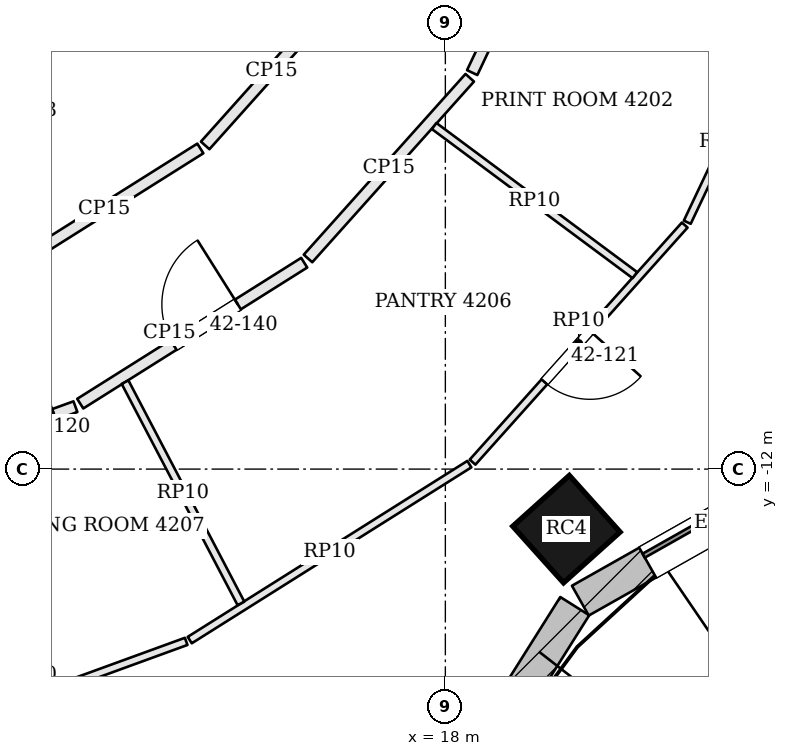
"""IFC4 building model, lengths in metres.
Left out: names, types, materials, properties, quantities, classifications, styles, units other than length and angle.
Written with IfcOpenShell. Run it as: python <this file> out.ifc"""

import sys

from ifc_helpers import new_model, si_unit, direction, frame, frame_2d, origin, origin_2d, place, context, subcontext, project, spatial, rectangle, extrude, element, fill, save


model = new_model("IFC4")
c1 = context("Model", 3, precision=1e-05, world=origin(), true_north=direction((0.0, 1.0)))
c2 = subcontext(c1, "Body", "Model", "MODEL_VIEW")
j1 = project(units=[si_unit("LENGTHUNIT", "METRE"), si_unit("PLANEANGLEUNIT", "RADIAN")], contexts=[c1])
p1 = place(None, origin())
s1 = spatial("IfcSite", under=j1, at=p1, CompositionType="ELEMENT")
p2 = place(p1, origin())
s2 = spatial("IfcBuilding", under=s1, at=p2, CompositionType="ELEMENT")
p3 = place(p2, frame((0.0, 0.0, 174.0)))
s3 = spatial("IfcBuildingStorey", under=s2, at=p3, CompositionType="ELEMENT", Elevation=174.0)
p4 = place(p3, frame((19.593, -12.79, -0.7), z_axis=(0.0, 0.0, 1.0), x_axis=(0.744021317198, 0.668155879683, 0.0)))
e1 = element("IfcColumn", 1, at=p4, inside=s3, PredefinedType="COLUMN", context=c2, shape_type="SweptSolid", body=[
    extrude(rectangle(XDim=1.0, YDim=1.0, at=origin_2d()), origin(), (0.0, 0.0, 1.0), 4.6),
])
p5 = place(p3, frame((16.998, -18.099, 0.0), z_axis=(0.0, 0.0, 1.0), x_axis=(0.532745661304, 0.846275404559, 0.0)))
e2 = element("IfcWall", 2, at=p5, inside=s3, PredefinedType="SOLIDWALL", context=c2, shape_type="SweptSolid", body=[
    extrude(rectangle(XDim=5.076, YDim=0.45, at=frame_2d((2.538, 0.0))), origin(), (0.0, 0.0, 1.0), 3.7),
])
p6 = place(p5, frame((1.488, 0.0, 0.9)))
e3 = element("IfcOpeningElement", 3, at=p6, cuts=e2, PredefinedType="OPENING", context=c2, shape_type="SweptSolid", body=[
    extrude(rectangle(XDim=2.1, YDim=2.3, at=frame_2d((1.05, 1.15))), frame((0.0, 0.235, 0.0), z_axis=(0.0, -1.0, 0.0), x_axis=(1.0, 0.0, 0.0)), (0.0, 0.0, 1.0), 0.47),
])
p7 = place(p3, frame((19.776, -13.731, 0.0), z_axis=(0.0, 0.0, 1.0), x_axis=(0.870610133829, 0.491973571318, 0.0)))
e4 = element("IfcWall", 4, at=p7, inside=s3, PredefinedType="SOLIDWALL", context=c2, shape_type="SweptSolid", body=[
    extrude(rectangle(XDim=4.134, YDim=0.45, at=frame_2d((2.067, 0.0))), origin(), (0.0, 0.0, 1.0), 3.7),
])
p8 = place(p7, frame((1.017, 0.0, 0.9)))
e5 = element("IfcOpeningElement", 5, at=p8, cuts=e4, PredefinedType="OPENING", context=c2, shape_type="SweptSolid", body=[
    extrude(rectangle(XDim=2.1, YDim=2.3, at=frame_2d((1.05, 1.15))), frame((0.0, 0.235, 0.0), z_axis=(0.0, -1.0, 0.0), x_axis=(1.0, 0.0, 0.0)), (0.0, 0.0, 1.0), 0.47),
])
p9 = place(p3, frame((9.676, -12.438, 0.0), z_axis=(0.0, 0.0, 1.0), x_axis=(0.939640289748, 0.342163887461, 0.0)))
e6 = element("IfcWall", 6, at=p9, inside=s3, PredefinedType="PARTITIONING", context=c2, shape_type="SweptSolid", body=[
    extrude(rectangle(XDim=3.68, YDim=0.15, at=frame_2d((1.84, 0.0))), origin(), (0.0, 0.0, 1.0), 3.084),
])
p10 = place(p9, frame((2.38, 0.0, 0.0)))
e7 = element("IfcOpeningElement", 7, at=p10, cuts=e6, PredefinedType="OPENING", context=c2, shape_type="SweptSolid", body=[
    extrude(rectangle(XDim=1.0, YDim=2.4, at=frame_2d((0.5, 1.2))), frame((0.0, 0.085, 0.0), z_axis=(0.0, -1.0, 0.0), x_axis=(1.0, 0.0, 0.0)), (0.0, 0.0, 1.0), 0.17),
])
p11 = place(p3, frame((13.197, -11.139, 0.0), z_axis=(0.0, 0.0, 1.0), x_axis=(0.846390903833, 0.532562144644, 0.0)))
e8 = element("IfcWall", 8, at=p11, inside=s3, PredefinedType="PARTITIONING", context=c2, shape_type="SweptSolid", body=[
    extrude(rectangle(XDim=3.481, YDim=0.15, at=frame_2d((1.741, 0.0))), origin(), (0.0, 0.0, 1.0), 3.084),
])
p12 = place(p11, frame((1.45, 0.0, 0.0)))
e9 = element("IfcOpeningElement", 9, at=p12, cuts=e8, PredefinedType="OPENING", context=c2, shape_type="SweptSolid", body=[
    extrude(rectangle(XDim=1.0, YDim=2.1, at=frame_2d((0.5, 1.05))), frame((0.0, 0.085, 0.0), z_axis=(0.0, -1.0, 0.0), x_axis=(1.0, 0.0, 0.0)), (0.0, 0.0, 1.0), 0.17),
])
p13 = place(p3, frame((16.193, -9.229, 0.0), z_axis=(0.0, 0.0, 1.0), x_axis=(0.666882089048, 0.745163256815, 0.0)))
e10 = element("IfcWall", 10, at=p13, inside=s3, PredefinedType="PARTITIONING", context=c2, shape_type="SweptSolid", body=[
    extrude(rectangle(XDim=3.19, YDim=0.15, at=frame_2d((1.595, 0.0))), origin(), (0.0, 0.0, 1.0), 3.084),
])
p14 = place(p3, frame((18.353, -6.784, 0.0), z_axis=(0.0, 0.0, 1.0), x_axis=(0.428125964575, 0.90371907054, 0.0)))
e11 = element("IfcWall", 11, at=p14, inside=s3, PredefinedType="PARTITIONING", context=c2, shape_type="SweptSolid", body=[
    extrude(rectangle(XDim=1.589, YDim=0.15, at=frame_2d((0.795, 0.0))), origin(), (0.0, 0.0, 1.0), 3.084),
])
p15 = place(p14, frame((0.35, 0.0, 0.0)))
e12 = element("IfcOpeningElement", 12, at=p15, cuts=e11, PredefinedType="OPENING", context=c2, shape_type="SweptSolid", body=[
    extrude(rectangle(XDim=0.9, YDim=2.1, at=frame_2d((0.45, 1.05))), frame((0.0, 0.085, 0.0), z_axis=(0.0, -1.0, 0.0), x_axis=(1.0, 0.0, 0.0)), (0.0, 0.0, 1.0), 0.17),
])
p16 = place(p3, frame((27.593, -8.816, 0.0), z_axis=(0.0, 0.0, 1.0), x_axis=(-0.9267854071, 0.375591279433, 0.0)))
e13 = element("IfcWall", 13, at=p16, inside=s3, PredefinedType="PARTITIONING", context=c2, shape_type="SweptSolid", body=[
    extrude(rectangle(XDim=9.161, YDim=0.15, at=frame_2d((4.58, 0.0))), origin(), (0.0, 0.0, 1.0), 3.234),
])
p17 = place(p3, frame((16.587, -5.789, 0.0), z_axis=(0.0, 0.0, 1.0), x_axis=(-0.666887460656, -0.745158449472, 0.0)))
e14 = element("IfcWall", 14, at=p17, inside=s3, PredefinedType="PARTITIONING", context=c2, shape_type="SweptSolid", body=[
    extrude(rectangle(XDim=2.62, YDim=0.15, at=frame_2d((1.31, 0.0))), origin(), (0.0, 0.0, 1.0), 3.084),
])
p18 = place(p3, frame((14.777, -7.781, 0.0), z_axis=(0.0, 0.0, 1.0), x_axis=(-0.846359741043, -0.532611667862, 0.0)))
e15 = element("IfcWall", 15, at=p18, inside=s3, PredefinedType="PARTITIONING", context=c2, shape_type="SweptSolid", body=[
    extrude(rectangle(XDim=2.987, YDim=0.15, at=frame_2d((1.494, 0.0))), origin(), (0.0, 0.0, 1.0), 3.084),
])
p19 = place(p3, frame((22.181, -6.645, 0.0), z_axis=(0.0, 0.0, 1.0), x_axis=(-0.428144841987, -0.903710127353, 0.0)))
e16 = element("IfcWall", 16, at=p19, inside=s3, PredefinedType="PARTITIONING", context=c2, shape_type="SweptSolid", body=[
    extrude(rectangle(XDim=2.332, YDim=0.1, at=frame_2d((1.166, 0.0))), origin(), (0.0, 0.0, 1.0), 3.084),
])
p20 = place(p3, frame((21.149, -8.789, 0.0), z_axis=(0.0, 0.0, 1.0), x_axis=(-0.666915902537, -0.745132994132, 0.0)))
e17 = element("IfcWall", 17, at=p20, inside=s3, PredefinedType="PARTITIONING", context=c2, shape_type="SweptSolid", body=[
    extrude(rectangle(XDim=4.186, YDim=0.1, at=frame_2d((2.093, 0.0))), origin(), (0.0, 0.0, 1.0), 3.084),
])
p21 = place(p20, frame((1.869, 0.0, 0.0)))
e18 = element("IfcOpeningElement", 18, at=p21, cuts=e17, PredefinedType="OPENING", context=c2, shape_type="SweptSolid", body=[
    extrude(rectangle(XDim=0.9, YDim=2.1, at=frame_2d((0.45, 1.05))), frame((0.0, 0.06, 0.0), z_axis=(0.0, -1.0, 0.0), x_axis=(1.0, 0.0, 0.0)), (0.0, 0.0, 1.0), 0.12),
])
p22 = place(p3, frame((18.316, -11.935, 0.0), z_axis=(0.0, 0.0, 1.0), x_axis=(-0.84637539713, -0.532586788358, 0.0)))
e19 = element("IfcWall", 19, at=p22, inside=s3, PredefinedType="PARTITIONING", context=c2, shape_type="SweptSolid", body=[
    extrude(rectangle(XDim=4.346, YDim=0.1, at=frame_2d((2.173, 0.0))), origin(), (0.0, 0.0, 1.0), 3.084),
])
p23 = place(p3, frame((14.59, -14.267, 0.0), z_axis=(0.0, 0.0, 1.0), x_axis=(-0.939623405418, -0.342210251148, 0.0)))
e20 = element("IfcWall", 20, at=p23, inside=s3, PredefinedType="PARTITIONING", context=c2, shape_type="SweptSolid", body=[
    extrude(rectangle(XDim=4.363, YDim=0.1, at=frame_2d((2.182, 0.0))), origin(), (0.0, 0.0, 1.0), 3.084),
])
p24 = place(p23, frame((2.15, 0.0, 0.0)))
e21 = element("IfcOpeningElement", 21, at=p24, cuts=e20, PredefinedType="OPENING", context=c2, shape_type="SweptSolid", body=[
    extrude(rectangle(XDim=1.0, YDim=2.1, at=frame_2d((0.5, 1.05))), frame((0.0, 0.06, 0.0), z_axis=(0.0, -1.0, 0.0), x_axis=(1.0, 0.0, 0.0)), (0.0, 0.0, 1.0), 0.12),
])
p25 = place(p3, frame((13.786, -10.856, 0.0), z_axis=(0.0, 0.0, 1.0), x_axis=(0.464015323866, -0.885827172318, 0.0)))
e22 = element("IfcWall", 22, at=p25, inside=s3, PredefinedType="PARTITIONING", context=c2, shape_type="SweptSolid", body=[
    extrude(rectangle(XDim=3.286, YDim=0.1, at=frame_2d((1.643, 0.0))), origin(), (0.0, 0.0, 1.0), 3.084),
])
p26 = place(p3, frame((17.853, -7.487, 0.0), z_axis=(0.0, 0.0, 1.0), x_axis=(0.802681916891, -0.596407361034, 0.0)))
e23 = element("IfcWall", 23, at=p26, inside=s3, PredefinedType="PARTITIONING", context=c2, shape_type="SweptSolid", body=[
    extrude(rectangle(XDim=3.289, YDim=0.1, at=frame_2d((1.645, 0.0))), origin(), (0.0, 0.0, 1.0), 3.084),
])
p27 = place(p8, origin())
e24 = element("IfcWindow", 24, at=p27, inside=s3, PartitioningType="SINGLE_PANEL", PredefinedType="WINDOW", context=c2, shape_type="SweptSolid", body=[
    extrude(rectangle(XDim=2.1, YDim=2.3, at=frame_2d((1.05, 1.15))), frame((0.0, 0.135, 0.0), z_axis=(0.0, -1.0, 0.0), x_axis=(1.0, 0.0, 0.0)), (0.0, 0.0, 1.0), 0.06),
])
fill(e5, e24)
p28 = place(p10, origin())
e25 = element("IfcDoor", 25, at=p28, inside=s3, OperationType="SINGLE_SWING_RIGHT", PredefinedType="DOOR", context=c2, shape_type="SweptSolid", body=[
    extrude(rectangle(XDim=1.0, YDim=2.4, at=frame_2d((0.5, 1.2))), frame((0.0, 0.025, 0.0), z_axis=(0.0, -1.0, 0.0), x_axis=(1.0, 0.0, 0.0)), (0.0, 0.0, 1.0), 0.05),
])
fill(e7, e25)
p29 = place(p21, origin())
e26 = element("IfcDoor", 26, at=p29, inside=s3, OperationType="SINGLE_SWING_LEFT", PredefinedType="DOOR", context=c2, shape_type="SweptSolid", body=[
    extrude(rectangle(XDim=0.9, YDim=2.1, at=frame_2d((0.45, 1.05))), frame((0.0, 0.025, 0.0), z_axis=(0.0, -1.0, 0.0), x_axis=(1.0, 0.0, 0.0)), (0.0, 0.0, 1.0), 0.05),
])
fill(e18, e26)
p30 = place(p12, origin())
e27 = element("IfcDoor", 27, at=p30, inside=s3, OperationType="SINGLE_SWING_RIGHT", PredefinedType="DOOR", context=c2, shape_type="SweptSolid", body=[
    extrude(rectangle(XDim=1.0, YDim=2.1, at=frame_2d((0.5, 1.05))), frame((0.0, 0.025, 0.0), z_axis=(0.0, -1.0, 0.0), x_axis=(1.0, 0.0, 0.0)), (0.0, 0.0, 1.0), 0.05),
])
fill(e9, e27)
save(model, sys.argv[1])
